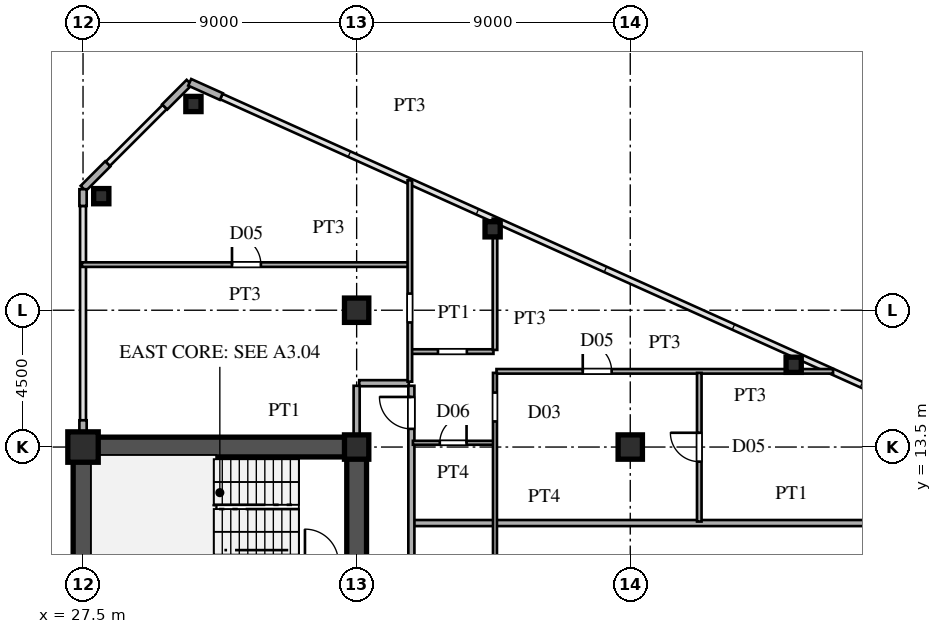
"""IFC4 building model, lengths in metres.
Left out: names, types, materials, properties, quantities, classifications, styles, units other than length and angle.
Written with IfcOpenShell. Run it as: python <this file> out.ifc"""

import sys

from ifc_helpers import new_model, si_unit, direction, frame, frame_2d, origin, origin_2d, place, context, subcontext, project, spatial, rectangle, hollow_rectangle, i_section, extrude, source, transform, mapped, element, fill, save


model = new_model("IFC4")
c1 = context("Model", 3, precision=1e-05, world=origin(), true_north=direction((0.0, 1.0)))
c2 = subcontext(c1, "Body", "Model", "MODEL_VIEW")
j1 = project(units=[si_unit("LENGTHUNIT", "METRE"), si_unit("PLANEANGLEUNIT", "RADIAN")], contexts=[c1])
p1 = place(None, origin())
s1 = spatial("IfcSite", under=j1, at=p1, CompositionType="ELEMENT")
p2 = place(p1, origin())
s2 = spatial("IfcBuilding", under=s1, at=p2, CompositionType="ELEMENT")
p3 = place(p2, frame((0.0, 0.0, 83.7)))
s3 = spatial("IfcBuildingStorey", under=s2, at=p3, CompositionType="ELEMENT", Elevation=83.7)
m1 = source(origin(), c2, "Body", "SweptSolid", [
    extrude(hollow_rectangle(XDim=1.0, YDim=1.0, WallThickness=0.042, at=origin_2d()), origin(), (0.0, 0.0, 1.0), 3.6),
])
p4 = place(p3, frame((27.5, 13.5, 0.0), z_axis=(0.0, 0.0, 1.0), x_axis=(1.0, 0.0, 0.0)))
e1 = element("IfcColumn", 1, at=p4, inside=s3, PredefinedType="COLUMN", context=c2, shape_type="MappedRepresentation", body=[
    mapped(m1, transform((0.0, 0.0, 0.0), scale=1.0)),
])
m2 = source(origin(), c2, "Body", "SweptSolid", [
    extrude(i_section(OverallWidth=0.8, OverallDepth=0.8, WebThickness=0.032, FlangeThickness=0.05, at=origin_2d()), origin(), (0.0, 0.0, 1.0), 3.6),
])
for number, where, z_axis, x_axis in (
    (2, (36.5, 13.5, 0.0), (0.0, 0.0, 1.0), (1.0, 0.0, 0.0)),
    (3, (36.5, 18.0, 0.0), (0.0, 0.0, 1.0), (1.0, 0.0, 0.0)),
    (4, (45.5, 13.5, 0.0), (0.0, 0.0, 1.0), (1.0, 0.0, 0.0)),
):
    element("IfcColumn", number, at=place(p3, frame(where, z_axis=z_axis, x_axis=x_axis)), inside=s3, PredefinedType="COLUMN", context=c2, shape_type="MappedRepresentation", body=[
        mapped(m2, transform((0.0, 0.0, 0.0), scale=1.0)),
    ])
m3 = source(origin(), c2, "Body", "SweptSolid", [
    extrude(hollow_rectangle(XDim=0.5, YDim=0.5, WallThickness=0.02, at=origin_2d()), origin(), (0.0, 0.0, 1.0), 3.6),
])
for number, where, z_axis, x_axis in (
    (5, (31.131, 24.783, 0.0), (0.0, 0.0, 1.0), (1.0, 0.0, 0.0)),
    (6, (28.1, 21.751, 0.0), (0.0, 0.0, 1.0), (1.0, 0.0, 0.0)),
    (7, (40.973, 20.661, 0.0), (0.0, 0.0, 1.0), (1.0, 0.0, 0.0)),
    (8, (50.875, 16.205, 0.0), (0.0, 0.0, 1.0), (1.0, 0.0, 0.0)),
):
    element("IfcColumn", number, at=place(p3, frame(where, z_axis=z_axis, x_axis=x_axis)), inside=s3, PredefinedType="COLUMN", context=c2, shape_type="MappedRepresentation", body=[
        mapped(m3, transform((0.0, 0.0, 0.0), scale=1.0)),
    ])
p5 = place(p3, frame((32.049, 25.028, 0.0), z_axis=(0.0, 0.0, 1.0), x_axis=(-0.911929519623, 0.410346866979, 0.0)))
e9 = element("IfcWall", 9, at=p5, inside=s3, PredefinedType="SOLIDWALL", context=c2, shape_type="SweptSolid", body=[
    extrude(rectangle(XDim=1.14, YDim=0.24, at=frame_2d((0.57, 0.0))), origin(), (0.0, 0.0, 1.0), 3.34),
])
for number, where, z_axis, x_axis in (
    (10, (30.993, 25.493, 0.0), (0.0, 0.0, 1.0), (-0.707, -0.707, 0.0)),
    (11, (28.313, 22.813, 0.0), (0.0, 0.0, 1.0), (-0.707, -0.707, 0.0)),
):
    element("IfcWall", number, at=place(p3, frame(where, z_axis=z_axis, x_axis=x_axis)), inside=s3, PredefinedType="SOLIDWALL", context=c2, shape_type="SweptSolid", body=[
        extrude(rectangle(XDim=1.14, YDim=0.24, at=frame_2d((0.57, 0.0))), origin(), (0.0, 0.0, 1.0), 3.34),
    ])
p6 = place(p3, frame((27.5, 13.83, 0.0), z_axis=(0.0, 0.0, 1.0), x_axis=(0.0, 1.0, 0.0)))
e12 = element("IfcWall", 12, at=p6, inside=s3, PredefinedType="SOLIDWALL", context=c2, shape_type="SweptSolid", body=[
    extrude(rectangle(XDim=0.55, YDim=0.24, at=frame_2d((0.275, 0.0))), origin(), (0.0, 0.0, 1.0), 2.84),
])
p7 = place(p3, frame((27.5, 21.43, 0.0), z_axis=(0.0, 0.0, 1.0), x_axis=(0.0, 1.0, 0.0)))
e13 = element("IfcWall", 13, at=p7, inside=s3, PredefinedType="SOLIDWALL", context=c2, shape_type="SweptSolid", body=[
    extrude(rectangle(XDim=0.55, YDim=0.24, at=frame_2d((0.275, 0.0))), origin(), (0.0, 0.0, 1.0), 3.34),
])
p8 = place(p3, frame((27.5, 1.3, 0.0), z_axis=(0.0, 0.0, 1.0), x_axis=(0.0, 1.0, 0.0)))
e14 = element("IfcWall", 14, at=p8, inside=s3, PredefinedType="SHEAR", context=c2, shape_type="SweptSolid", body=[
    extrude(rectangle(XDim=12.2, YDim=0.65, at=frame_2d((6.1, 0.0))), origin(), (0.0, 0.0, 1.0), 3.34),
])
p9 = place(p3, frame((27.5, 13.5, 0.0), z_axis=(0.0, 0.0, 1.0), x_axis=(1.0, 0.0, 0.0)))
e15 = element("IfcWall", 15, at=p9, inside=s3, PredefinedType="SHEAR", context=c2, shape_type="SweptSolid", body=[
    extrude(rectangle(XDim=9.0, YDim=0.65, at=frame_2d((4.5, 0.0))), origin(), (0.0, 0.0, 1.0), 3.34),
])
p10 = place(p3, frame((36.5, 8.2, 0.0), z_axis=(0.0, 0.0, 1.0), x_axis=(0.0, 1.0, 0.0)))
e16 = element("IfcWall", 16, at=p10, inside=s3, PredefinedType="SHEAR", context=c2, shape_type="SweptSolid", body=[
    extrude(rectangle(XDim=5.45, YDim=0.65, at=frame_2d((2.725, 0.0))), origin(), (0.0, 0.0, 1.0), 3.34),
])
p11 = place(p10, frame((0.245, 0.0, 0.0)))
e17 = element("IfcOpeningElement", 17, at=p11, cuts=e16, PredefinedType="OPENING", context=c2, shape_type="SweptSolid", body=[
    extrude(rectangle(XDim=0.95, YDim=2.15, at=frame_2d((0.475, 1.075))), frame((0.0, 0.335, 0.0), z_axis=(0.0, -1.0, 0.0), x_axis=(1.0, 0.0, 0.0)), (0.0, 0.0, 1.0), 0.67),
])
p12 = place(p3, frame((38.38, 11.0, 0.0), z_axis=(0.0, 0.0, 1.0), x_axis=(1.0, 0.0, 0.0)))
e18 = element("IfcWall", 18, at=p12, inside=s3, PredefinedType="PARTITIONING", context=c2, shape_type="SweptSolid", body=[
    extrude(rectangle(XDim=24.854, YDim=0.2, at=frame_2d((12.427, 0.0))), origin(), (0.0, 0.0, 1.0), 3.34),
])
p13 = place(p3, frame((38.35, 13.64, 0.0), z_axis=(0.0, 0.0, 1.0), x_axis=(1.0, 0.0, 0.0)))
e19 = element("IfcWall", 19, at=p13, inside=s3, PredefinedType="PARTITIONING", context=c2, shape_type="SweptSolid", body=[
    extrude(rectangle(XDim=2.65, YDim=0.13, at=frame_2d((1.325, 0.0))), origin(), (0.0, 0.0, 1.0), 2.44),
])
p14 = place(p13, frame((0.885, 0.0, 0.0)))
e20 = element("IfcOpeningElement", 20, at=p14, cuts=e19, PredefinedType="OPENING", context=c2, shape_type="SweptSolid", body=[
    extrude(rectangle(XDim=0.88, YDim=2.1, at=frame_2d((0.44, 1.05))), frame((0.0, 0.075, 0.0), z_axis=(0.0, -1.0, 0.0), x_axis=(1.0, 0.0, 0.0)), (0.0, 0.0, 1.0), 0.15),
])
p15 = place(p3, frame((36.585, 15.6, 0.0), z_axis=(0.0, 0.0, 1.0), x_axis=(1.0, 0.0, 0.0)))
e21 = element("IfcWall", 21, at=p15, inside=s3, PredefinedType="PARTITIONING", context=c2, shape_type="SweptSolid", body=[
    extrude(rectangle(XDim=1.63, YDim=0.2, at=frame_2d((0.815, 0.0))), origin(), (0.0, 0.0, 1.0), 3.34),
])
p16 = place(p3, frame((41.1, 15.99, 0.0), z_axis=(0.0, 0.0, 1.0), x_axis=(1.0, 0.0, 0.0)))
e22 = element("IfcWall", 22, at=p16, inside=s3, PredefinedType="PARTITIONING", context=c2, shape_type="SweptSolid", body=[
    extrude(rectangle(XDim=11.071, YDim=0.15, at=frame_2d((5.535, 0.0))), origin(), (0.0, 0.0, 1.0), 3.34),
])
p17 = place(p16, frame((2.837, 0.0, 0.0)))
e23 = element("IfcOpeningElement", 23, at=p17, cuts=e22, PredefinedType="OPENING", context=c2, shape_type="SweptSolid", body=[
    extrude(rectangle(XDim=0.95, YDim=2.15, at=frame_2d((0.475, 1.075))), frame((0.0, 0.085, 0.0), z_axis=(0.0, -1.0, 0.0), x_axis=(1.0, 0.0, 0.0)), (0.0, 0.0, 1.0), 0.17),
])
p18 = place(p3, frame((38.3, 16.64, 0.0), z_axis=(0.0, 0.0, 1.0), x_axis=(1.0, 0.0, 0.0)))
e24 = element("IfcWall", 24, at=p18, inside=s3, PredefinedType="PARTITIONING", context=c2, shape_type="SweptSolid", body=[
    extrude(rectangle(XDim=2.7, YDim=0.15, at=frame_2d((1.35, 0.0))), origin(), (0.0, 0.0, 1.0), 3.34),
])
p19 = place(p18, frame((0.875, 0.0, 0.0)))
e25 = element("IfcOpeningElement", 25, at=p19, cuts=e24, PredefinedType="OPENING", context=c2, shape_type="SweptSolid", body=[
    extrude(rectangle(XDim=0.95, YDim=2.15, at=frame_2d((0.475, 1.075))), frame((0.0, 0.085, 0.0), z_axis=(0.0, -1.0, 0.0), x_axis=(1.0, 0.0, 0.0)), (0.0, 0.0, 1.0), 0.17),
])
p20 = place(p3, frame((27.465, 19.5, 0.0), z_axis=(0.0, 0.0, 1.0), x_axis=(1.0, 0.0, 0.0)))
e26 = element("IfcWall", 26, at=p20, inside=s3, PredefinedType="PARTITIONING", context=c2, shape_type="SweptSolid", body=[
    extrude(rectangle(XDim=10.735, YDim=0.15, at=frame_2d((5.367, 0.0))), origin(), (0.0, 0.0, 1.0), 3.34),
])
p21 = place(p20, frame((4.935, 0.0, 0.0)))
e27 = element("IfcOpeningElement", 27, at=p21, cuts=e26, PredefinedType="OPENING", context=c2, shape_type="SweptSolid", body=[
    extrude(rectangle(XDim=0.95, YDim=2.15, at=frame_2d((0.475, 1.075))), frame((0.0, 0.085, 0.0), z_axis=(0.0, -1.0, 0.0), x_axis=(1.0, 0.0, 0.0)), (0.0, 0.0, 1.0), 0.17),
])
p22 = place(p3, frame((36.5, 13.83, 0.0), z_axis=(0.0, 0.0, 1.0), x_axis=(0.0, 1.0, 0.0)))
e28 = element("IfcWall", 28, at=p22, inside=s3, PredefinedType="PARTITIONING", context=c2, shape_type="SweptSolid", body=[
    extrude(rectangle(XDim=1.685, YDim=0.2, at=frame_2d((0.842, 0.0))), origin(), (0.0, 0.0, 1.0), 2.44),
])
p23 = place(p3, frame((38.25, 15.65, 0.0), z_axis=(0.0, 0.0, 1.0), x_axis=(0.0, 1.0, 0.0)))
e29 = element("IfcWall", 29, at=p23, inside=s3, PredefinedType="PARTITIONING", context=c2, shape_type="SweptSolid", body=[
    extrude(rectangle(XDim=6.623, YDim=0.15, at=frame_2d((3.312, 0.0))), origin(), (0.0, 0.0, 1.0), 3.34),
])
p24 = place(p23, frame((1.948, 0.0, 0.0)))
e30 = element("IfcOpeningElement", 30, at=p24, cuts=e29, PredefinedType="OPENING", context=c2, shape_type="SweptSolid", body=[
    extrude(rectangle(XDim=0.95, YDim=2.15, at=frame_2d((0.475, 1.075))), frame((0.0, 0.085, 0.0), z_axis=(0.0, -1.0, 0.0), x_axis=(1.0, 0.0, 0.0)), (0.0, 0.0, 1.0), 0.17),
])
p25 = place(p3, frame((38.3, -15.515, 0.0), z_axis=(0.0, 0.0, 1.0), x_axis=(0.0, 1.0, 0.0)))
e31 = element("IfcWall", 31, at=p25, inside=s3, PredefinedType="PARTITIONING", context=c2, shape_type="SweptSolid", body=[
    extrude(rectangle(XDim=31.03, YDim=0.2, at=frame_2d((15.515, 0.0))), origin(), (0.0, 0.0, 1.0), 3.34),
])
p26 = place(p25, frame((0.16, 0.0, 0.0)))
e32 = element("IfcOpeningElement", 32, at=p26, cuts=e31, PredefinedType="OPENING", context=c2, shape_type="SweptSolid", body=[
    extrude(rectangle(XDim=1.05, YDim=2.25, at=frame_2d((0.525, 1.125))), frame((0.0, 0.11, 0.0), z_axis=(0.0, -1.0, 0.0), x_axis=(1.0, 0.0, 0.0)), (0.0, 0.0, 1.0), 0.22),
])
p27 = place(p25, frame((9.067, 0.0, 0.0)))
e33 = element("IfcOpeningElement", 33, at=p27, cuts=e31, PredefinedType="OPENING", context=c2, shape_type="SweptSolid", body=[
    extrude(rectangle(XDim=1.05, YDim=2.25, at=frame_2d((0.525, 1.125))), frame((0.0, 0.11, 0.0), z_axis=(0.0, -1.0, 0.0), x_axis=(1.0, 0.0, 0.0)), (0.0, 0.0, 1.0), 0.22),
])
p28 = place(p25, frame((20.325, 0.0, 0.0)))
e34 = element("IfcOpeningElement", 34, at=p28, cuts=e31, PredefinedType="OPENING", context=c2, shape_type="SweptSolid", body=[
    extrude(rectangle(XDim=1.05, YDim=2.25, at=frame_2d((0.525, 1.125))), frame((0.0, 0.11, 0.0), z_axis=(0.0, -1.0, 0.0), x_axis=(1.0, 0.0, 0.0)), (0.0, 0.0, 1.0), 0.22),
])
p29 = place(p25, frame((29.613, 0.0, 0.0)))
e35 = element("IfcOpeningElement", 35, at=p29, cuts=e31, PredefinedType="OPENING", context=c2, shape_type="SweptSolid", body=[
    extrude(rectangle(XDim=1.05, YDim=2.25, at=frame_2d((0.525, 1.125))), frame((0.0, 0.11, 0.0), z_axis=(0.0, -1.0, 0.0), x_axis=(1.0, 0.0, 0.0)), (0.0, 0.0, 1.0), 0.22),
])
p30 = place(p3, frame((41.05, 7.752, 0.0), z_axis=(0.0, 0.0, 1.0), x_axis=(0.0, 1.0, 0.0)))
e36 = element("IfcWall", 36, at=p30, inside=s3, PredefinedType="PARTITIONING", context=c2, shape_type="SweptSolid", body=[
    extrude(rectangle(XDim=8.187, YDim=0.13, at=frame_2d((4.094, 0.0))), origin(), (0.0, 0.0, 1.0), 2.94),
])
p31 = place(p30, frame((6.59, 0.0, 0.0)))
e37 = element("IfcOpeningElement", 37, at=p31, cuts=e36, PredefinedType="OPENING", context=c2, shape_type="SweptSolid", body=[
    extrude(rectangle(XDim=0.95, YDim=2.15, at=frame_2d((0.475, 1.075))), frame((0.0, 0.075, 0.0), z_axis=(0.0, -1.0, 0.0), x_axis=(1.0, 0.0, 0.0)), (0.0, 0.0, 1.0), 0.15),
])
p32 = place(p3, frame((41.05, 16.695, 0.0), z_axis=(0.0, 0.0, 1.0), x_axis=(0.0, 1.0, 0.0)))
e38 = element("IfcWall", 38, at=p32, inside=s3, PredefinedType="PARTITIONING", context=c2, shape_type="SweptSolid", body=[
    extrude(rectangle(XDim=4.317, YDim=0.15, at=frame_2d((2.158, 0.0))), origin(), (0.0, 0.0, 1.0), 3.34),
])
p33 = place(p3, frame((47.77, 11.05, 0.0), z_axis=(0.0, 0.0, 1.0), x_axis=(0.0, 1.0, 0.0)))
e39 = element("IfcWall", 39, at=p33, inside=s3, PredefinedType="PARTITIONING", context=c2, shape_type="SweptSolid", body=[
    extrude(rectangle(XDim=4.889, YDim=0.15, at=frame_2d((2.444, 0.0))), origin(), (0.0, 0.0, 1.0), 3.34),
])
p34 = place(p33, frame((1.969, 0.0, 0.0)))
e40 = element("IfcOpeningElement", 40, at=p34, cuts=e39, PredefinedType="OPENING", context=c2, shape_type="SweptSolid", body=[
    extrude(rectangle(XDim=0.95, YDim=2.15, at=frame_2d((0.475, 1.075))), frame((0.0, 0.085, 0.0), z_axis=(0.0, -1.0, 0.0), x_axis=(1.0, 0.0, 0.0)), (0.0, 0.0, 1.0), 0.17),
])
m4 = source(origin(), c2, "Body", "SweptSolid", [
    extrude(rectangle(XDim=0.88, YDim=2.1, at=frame_2d((0.44, 1.05))), frame((0.0, 0.025, 0.0), z_axis=(0.0, -1.0, 0.0), x_axis=(1.0, 0.0, 0.0)), (0.0, 0.0, 1.0), 0.05),
])
p35 = place(p14, origin())
e41 = element("IfcDoor", 41, at=p35, inside=s3, OperationType="SINGLE_SWING_RIGHT", PredefinedType="DOOR", context=c2, shape_type="MappedRepresentation", body=[
    mapped(m4, transform((0.0, 0.0, 0.0), scale=1.0)),
])
fill(e20, e41)
m5 = source(origin(), c2, "Body", "SweptSolid", [
    extrude(rectangle(XDim=0.95, YDim=2.15, at=frame_2d((0.475, 1.075))), frame((0.0, 0.025, 0.0), z_axis=(0.0, -1.0, 0.0), x_axis=(1.0, 0.0, 0.0)), (0.0, 0.0, 1.0), 0.05),
])
p36 = place(p17, origin())
e42 = element("IfcDoor", 42, at=p36, inside=s3, OperationType="SINGLE_SWING_LEFT", PredefinedType="DOOR", context=c2, shape_type="MappedRepresentation", body=[
    mapped(m5, transform((0.0, 0.0, 0.0), scale=1.0)),
])
fill(e23, e42)
p37 = place(p21, origin())
e43 = element("IfcDoor", 43, at=p37, inside=s3, OperationType="SINGLE_SWING_LEFT", PredefinedType="DOOR", context=c2, shape_type="MappedRepresentation", body=[
    mapped(m5, transform((0.0, 0.0, 0.0), scale=1.0)),
])
fill(e27, e43)
m6 = source(origin(), c2, "Body", "SweptSolid", [
    extrude(rectangle(XDim=1.05, YDim=2.25, at=frame_2d((0.525, 1.125))), frame((0.0, 0.025, 0.0), z_axis=(0.0, -1.0, 0.0), x_axis=(1.0, 0.0, 0.0)), (0.0, 0.0, 1.0), 0.05),
])
p38 = place(p29, origin())
e44 = element("IfcDoor", 44, at=p38, inside=s3, OperationType="SINGLE_SWING_RIGHT", PredefinedType="DOOR", context=c2, shape_type="MappedRepresentation", body=[
    mapped(m6, transform((0.0, 0.0, 0.0), scale=1.0)),
])
fill(e35, e44)
p39 = place(p34, origin())
e45 = element("IfcDoor", 45, at=p39, inside=s3, OperationType="SINGLE_SWING_RIGHT", PredefinedType="DOOR", context=c2, shape_type="MappedRepresentation", body=[
    mapped(m5, transform((0.0, 0.0, 0.0), scale=1.0)),
])
fill(e40, e45)
save(model, sys.argv[1])
